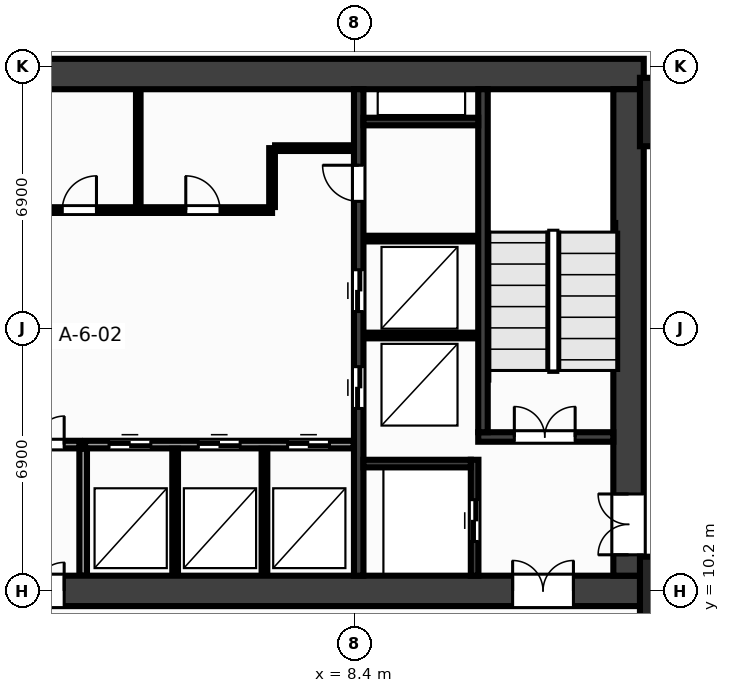
"""IFC4 building model, lengths in metres.
Left out: names, types, materials, properties, quantities, classifications, styles, units other than length and angle.
Written with IfcOpenShell. Run it as: python <this file> out.ifc"""

import sys

from ifc_helpers import new_model, si_unit, direction, frame, frame_2d, origin, origin_2d, place, context, subcontext, project, spatial, rectangle, extrude, source, transform, mapped, element, fill, save


model = new_model("IFC4")
c1 = context("Model", 3, precision=1e-05, world=origin(), true_north=direction((0.0, 1.0)))
c2 = subcontext(c1, "Body", "Model", "MODEL_VIEW")
j1 = project(units=[si_unit("LENGTHUNIT", "METRE"), si_unit("PLANEANGLEUNIT", "RADIAN")], contexts=[c1])
p1 = place(None, origin())
s1 = spatial("IfcSite", under=j1, at=p1, CompositionType="ELEMENT")
p2 = place(p1, origin())
s2 = spatial("IfcBuilding", under=s1, at=p2, CompositionType="ELEMENT")
p3 = place(p2, origin())
s3 = spatial("IfcBuildingStorey", under=s2, at=p3, CompositionType="ELEMENT", Elevation=0.0)
m1 = source(origin(), c2, "Body", "SweptSolid", [
    extrude(rectangle(XDim=32.0, YDim=0.8, at=frame_2d((16.0, 0.0))), origin(), (0.0, 0.0, 1.0), 5.0),
])
p4 = place(p3, frame((-16.0, 23.8, 0.0), z_axis=(0.0, 0.0, 1.0), x_axis=(1.0, 0.0, 0.0)))
e1 = element("IfcWall", 1, at=p4, inside=s3, PredefinedType="SHEAR", context=c2, shape_type="MappedRepresentation", body=[
    mapped(m1, transform((0.0, 0.0, 0.0), x_axis=(1.0, 0.0, 0.0), y_axis=(0.0, 1.0, 0.0), z_axis=(0.0, 0.0, 1.0), scale=1.0)),
])
p5 = place(p3, frame((-16.0, 10.2, 0.0), z_axis=(0.0, 0.0, 1.0), x_axis=(1.0, 0.0, 0.0)))
e2 = element("IfcWall", 2, at=p5, inside=s3, PredefinedType="SHEAR", context=c2, shape_type="MappedRepresentation", body=[
    mapped(m1, transform((0.0, 0.0, 0.0), x_axis=(1.0, 0.0, 0.0), y_axis=(0.0, 1.0, 0.0), z_axis=(0.0, 0.0, 1.0), scale=1.0)),
])
p6 = place(p5, frame((28.55, 0.0, 0.0)))
e3 = element("IfcOpeningElement", 3, at=p6, cuts=e2, PredefinedType="OPENING", context=c2, shape_type="SweptSolid", body=[
    extrude(rectangle(XDim=1.6, YDim=2.15, at=frame_2d((0.8, 1.075))), frame((0.0, 0.412, 0.0), z_axis=(0.0, -1.0, 0.0), x_axis=(1.0, 0.0, 0.0)), (0.0, 0.0, 1.0), 0.824),
])
p7 = place(p5, frame((15.25, 0.0, 0.0)))
e4 = element("IfcOpeningElement", 4, at=p7, cuts=e2, PredefinedType="OPENING", context=c2, shape_type="SweptSolid", body=[
    extrude(rectangle(XDim=1.5, YDim=2.2, at=frame_2d((0.75, 1.1))), frame((0.0, 0.412, 0.0), z_axis=(0.0, -1.0, 0.0), x_axis=(1.0, 0.0, 0.0)), (0.0, 0.0, 1.0), 0.824),
])
m2 = source(origin(), c2, "Body", "SweptSolid", [
    extrude(rectangle(XDim=12.8, YDim=0.8, at=frame_2d((6.4, 0.0))), origin(), (0.0, 0.0, 1.0), 5.0),
])
p8 = place(p3, frame((15.6, 10.6, 0.0), z_axis=(0.0, 0.0, 1.0), x_axis=(0.0, 1.0, 0.0)))
e5 = element("IfcWall", 5, at=p8, inside=s3, PredefinedType="SHEAR", context=c2, shape_type="MappedRepresentation", body=[
    mapped(m2, transform((0.0, 0.0, 0.0), x_axis=(1.0, 0.0, 0.0), y_axis=(0.0, 1.0, 0.0), z_axis=(0.0, 0.0, 1.0), scale=1.0)),
])
p9 = place(p8, frame((0.55, 0.0, 0.0)))
e6 = element("IfcOpeningElement", 6, at=p9, cuts=e5, PredefinedType="OPENING", context=c2, shape_type="SweptSolid", body=[
    extrude(rectangle(XDim=1.6, YDim=2.15, at=frame_2d((0.8, 1.075))), frame((0.0, 0.412, 0.0), z_axis=(0.0, -1.0, 0.0), x_axis=(1.0, 0.0, 0.0)), (0.0, 0.0, 1.0), 0.824),
])
m3 = source(origin(), c2, "Body", "SweptSolid", [
    extrude(rectangle(XDim=12.8, YDim=0.25, at=frame_2d((6.4, 0.0))), origin(), (0.0, 0.0, 1.0), 5.0),
])
p10 = place(p3, frame((8.5, 10.6, 0.0), z_axis=(0.0, 0.0, 1.0), x_axis=(0.0, 1.0, 0.0)))
e7 = element("IfcWall", 7, at=p10, inside=s3, PredefinedType="SHEAR", context=c2, shape_type="MappedRepresentation", body=[
    mapped(m3, transform((0.0, 0.0, 0.0), x_axis=(1.0, 0.0, 0.0), y_axis=(0.0, 1.0, 0.0), z_axis=(0.0, 0.0, 1.0), scale=1.0)),
])
p11 = place(p10, frame((4.4, 0.0, 0.0)))
e8 = element("IfcOpeningElement", 8, at=p11, cuts=e7, PredefinedType="OPENING", context=c2, shape_type="SweptSolid", body=[
    extrude(rectangle(XDim=1.1, YDim=2.15, at=frame_2d((0.55, 1.075))), frame((0.0, 0.137, 0.0), z_axis=(0.0, -1.0, 0.0), x_axis=(1.0, 0.0, 0.0)), (0.0, 0.0, 1.0), 0.274),
])
p12 = place(p10, frame((6.95, 0.0, 0.0)))
e9 = element("IfcOpeningElement", 9, at=p12, cuts=e7, PredefinedType="OPENING", context=c2, shape_type="SweptSolid", body=[
    extrude(rectangle(XDim=1.1, YDim=2.15, at=frame_2d((0.55, 1.075))), frame((0.0, 0.137, 0.0), z_axis=(0.0, -1.0, 0.0), x_axis=(1.0, 0.0, 0.0)), (0.0, 0.0, 1.0), 0.274),
])
p13 = place(p10, frame((9.85, 0.0, 0.0)))
e10 = element("IfcOpeningElement", 10, at=p13, cuts=e7, PredefinedType="OPENING", context=c2, shape_type="SweptSolid", body=[
    extrude(rectangle(XDim=0.95, YDim=2.15, at=frame_2d((0.475, 1.075))), frame((0.0, 0.137, 0.0), z_axis=(0.0, -1.0, 0.0), x_axis=(1.0, 0.0, 0.0)), (0.0, 0.0, 1.0), 0.274),
])
m4 = source(origin(), c2, "Body", "SweptSolid", [
    extrude(rectangle(XDim=3.555, YDim=0.25, at=frame_2d((1.777, 0.0))), origin(), (0.0, 0.0, 1.0), 5.0),
])
p14 = place(p3, frame((11.645, 14.25, 0.0), z_axis=(0.0, 0.0, 1.0), x_axis=(1.0, 0.0, 0.0)))
e11 = element("IfcWall", 11, at=p14, inside=s3, PredefinedType="SHEAR", context=c2, shape_type="MappedRepresentation", body=[
    mapped(m4, transform((0.0, 0.0, 0.0), x_axis=(1.0, 0.0, 0.0), y_axis=(0.0, 1.0, 0.0), z_axis=(0.0, 0.0, 1.0), scale=1.0)),
])
p15 = place(p14, frame((0.95, 0.0, 0.0)))
e12 = element("IfcOpeningElement", 12, at=p15, cuts=e11, PredefinedType="OPENING", context=c2, shape_type="SweptSolid", body=[
    extrude(rectangle(XDim=1.6, YDim=2.15, at=frame_2d((0.8, 1.075))), frame((0.0, 0.137, 0.0), z_axis=(0.0, -1.0, 0.0), x_axis=(1.0, 0.0, 0.0)), (0.0, 0.0, 1.0), 0.274),
])
m5 = source(origin(), c2, "Body", "SweptSolid", [
    extrude(rectangle(XDim=9.025, YDim=0.25, at=frame_2d((4.512, 0.0))), origin(), (0.0, 0.0, 1.0), 5.0),
])
p16 = place(p3, frame((11.77, 14.375, 0.0), z_axis=(0.0, 0.0, 1.0), x_axis=(0.0, 1.0, 0.0)))
e13 = element("IfcWall", 13, at=p16, inside=s3, PredefinedType="SHEAR", context=c2, shape_type="MappedRepresentation", body=[
    mapped(m5, transform((0.0, 0.0, 0.0), x_axis=(1.0, 0.0, 0.0), y_axis=(0.0, 1.0, 0.0), z_axis=(0.0, 0.0, 1.0), scale=1.0)),
])
m6 = source(origin(), c2, "Body", "SweptSolid", [
    extrude(rectangle(XDim=3.05, YDim=0.2, at=frame_2d((1.525, 0.0))), origin(), (0.0, 0.0, 1.0), 5.0),
])
p17 = place(p3, frame((11.55, 10.6, 0.0), z_axis=(0.0, 0.0, 1.0), x_axis=(0.0, 1.0, 0.0)))
e14 = element("IfcWall", 14, at=p17, inside=s3, PredefinedType="SHEAR", context=c2, shape_type="MappedRepresentation", body=[
    mapped(m6, transform((0.0, 0.0, 0.0), x_axis=(1.0, 0.0, 0.0), y_axis=(0.0, 1.0, 0.0), z_axis=(0.0, 0.0, 1.0), scale=1.0)),
])
p18 = place(p17, frame((0.9, 0.0, 0.0)))
e15 = element("IfcOpeningElement", 15, at=p18, cuts=e14, PredefinedType="OPENING", context=c2, shape_type="SweptSolid", body=[
    extrude(rectangle(XDim=1.1, YDim=2.15, at=frame_2d((0.55, 1.075))), frame((0.0, 0.112, 0.0), z_axis=(0.0, -1.0, 0.0), x_axis=(1.0, 0.0, 0.0)), (0.0, 0.0, 1.0), 0.224),
])
m7 = source(origin(), c2, "Body", "SweptSolid", [
    extrude(rectangle(XDim=2.825, YDim=0.2, at=frame_2d((1.413, 0.0))), origin(), (0.0, 0.0, 1.0), 5.0),
])
p19 = place(p3, frame((8.625, 13.55, 0.0), z_axis=(0.0, 0.0, 1.0), x_axis=(1.0, 0.0, 0.0)))
e16 = element("IfcWall", 16, at=p19, inside=s3, PredefinedType="SHEAR", context=c2, shape_type="MappedRepresentation", body=[
    mapped(m7, transform((0.0, 0.0, 0.0), x_axis=(1.0, 0.0, 0.0), y_axis=(0.0, 1.0, 0.0), z_axis=(0.0, 0.0, 1.0), scale=1.0)),
])
m8 = source(origin(), c2, "Body", "SweptSolid", [
    extrude(rectangle(XDim=3.02, YDim=0.2, at=frame_2d((1.51, 0.0))), origin(), (0.0, 0.0, 1.0), 5.0),
])
p20 = place(p3, frame((8.625, 22.55, 0.0), z_axis=(0.0, 0.0, 1.0), x_axis=(1.0, 0.0, 0.0)))
e17 = element("IfcWall", 17, at=p20, inside=s3, PredefinedType="SHEAR", context=c2, shape_type="MappedRepresentation", body=[
    mapped(m8, transform((0.0, 0.0, 0.0), x_axis=(1.0, 0.0, 0.0), y_axis=(0.0, 1.0, 0.0), z_axis=(0.0, 0.0, 1.0), scale=1.0)),
])
m9 = source(origin(), c2, "Body", "SweptSolid", [
    extrude(rectangle(XDim=1.8, YDim=1.8, at=origin_2d()), origin(), (0.0, 0.0, 1.0), 5.0),
])
for number, where, z_axis, x_axis in (
    (18, (16.8, 10.2, 0.0), (0.0, 0.0, 1.0), (1.0, 0.0, 0.0)),
    (19, (16.8, 22.8, 0.0), (0.0, 0.0, 1.0), (1.0, 0.0, 0.0)),
):
    element("IfcColumn", number, at=place(p3, frame(where, z_axis=z_axis, x_axis=x_axis)), inside=s3, PredefinedType="COLUMN", context=c2, shape_type="MappedRepresentation", body=[
        mapped(m9, transform((0.0, 0.0, 0.0), x_axis=(1.0, 0.0, 0.0), y_axis=(0.0, 1.0, 0.0), z_axis=(0.0, 0.0, 1.0), scale=1.0)),
    ])
m10 = source(origin(), c2, "Body", "SweptSolid", [
    extrude(rectangle(XDim=3.01, YDim=0.15, at=frame_2d((1.505, 0.0))), origin(), (0.0, 0.0, 1.0), 4.72),
])
for number, where, z_axis, x_axis in (
    (20, (8.63, 16.92, 0.0), (0.0, 0.0, 1.0), (1.0, 0.0, 0.0)),
    (21, (8.63, 19.47, 0.0), (0.0, 0.0, 1.0), (1.0, 0.0, 0.0)),
):
    element("IfcWall", number, at=place(p3, frame(where, z_axis=z_axis, x_axis=x_axis)), inside=s3, PredefinedType="PARTITIONING", context=c2, shape_type="MappedRepresentation", body=[
        mapped(m10, transform((0.0, 0.0, 0.0), x_axis=(1.0, 0.0, 0.0), y_axis=(0.0, 1.0, 0.0), z_axis=(0.0, 0.0, 1.0), scale=1.0)),
    ])
m11 = source(origin(), c2, "Body", "SweptSolid", [
    extrude(rectangle(XDim=7.07, YDim=0.2, at=frame_2d((3.535, 0.0))), origin(), (0.0, 0.0, 1.0), 4.72),
])
p21 = place(p3, frame((1.3, 14.05, 0.0), z_axis=(0.0, 0.0, 1.0), x_axis=(1.0, 0.0, 0.0)))
e22 = element("IfcWall", 22, at=p21, inside=s3, PredefinedType="PARTITIONING", context=c2, shape_type="MappedRepresentation", body=[
    mapped(m11, transform((0.0, 0.0, 0.0), x_axis=(1.0, 0.0, 0.0), y_axis=(0.0, 1.0, 0.0), z_axis=(0.0, 0.0, 1.0), scale=1.0)),
])
p22 = place(p21, frame((0.63, 0.0, 0.0)))
e23 = element("IfcOpeningElement", 23, at=p22, cuts=e22, PredefinedType="OPENING", context=c2, shape_type="SweptSolid", body=[
    extrude(rectangle(XDim=1.1, YDim=2.15, at=frame_2d((0.55, 1.075))), frame((0.0, 0.112, 0.0), z_axis=(0.0, -1.0, 0.0), x_axis=(1.0, 0.0, 0.0)), (0.0, 0.0, 1.0), 0.224),
])
p23 = place(p21, frame((2.98, 0.0, 0.0)))
e24 = element("IfcOpeningElement", 24, at=p23, cuts=e22, PredefinedType="OPENING", context=c2, shape_type="SweptSolid", body=[
    extrude(rectangle(XDim=1.1, YDim=2.15, at=frame_2d((0.55, 1.075))), frame((0.0, 0.112, 0.0), z_axis=(0.0, -1.0, 0.0), x_axis=(1.0, 0.0, 0.0)), (0.0, 0.0, 1.0), 0.224),
])
p24 = place(p21, frame((5.33, 0.0, 0.0)))
e25 = element("IfcOpeningElement", 25, at=p24, cuts=e22, PredefinedType="OPENING", context=c2, shape_type="SweptSolid", body=[
    extrude(rectangle(XDim=1.1, YDim=2.15, at=frame_2d((0.55, 1.075))), frame((0.0, 0.112, 0.0), z_axis=(0.0, -1.0, 0.0), x_axis=(1.0, 0.0, 0.0)), (0.0, 0.0, 1.0), 0.224),
])
m12 = source(origin(), c2, "Body", "SweptSolid", [
    extrude(rectangle(XDim=3.34, YDim=0.2, at=frame_2d((1.67, 0.0))), origin(), (0.0, 0.0, 1.0), 4.72),
])
p25 = place(p3, frame((1.25, 10.6, 0.0), z_axis=(0.0, 0.0, 1.0), x_axis=(0.0, 1.0, 0.0)))
e26 = element("IfcWall", 26, at=p25, inside=s3, PredefinedType="PARTITIONING", context=c2, shape_type="MappedRepresentation", body=[
    mapped(m12, transform((0.0, 0.0, 0.0), x_axis=(1.0, 0.0, 0.0), y_axis=(0.0, 1.0, 0.0), z_axis=(0.0, 0.0, 1.0), scale=1.0)),
])
m13 = source(origin(), c2, "Body", "SweptSolid", [
    extrude(rectangle(XDim=2.3, YDim=0.2, at=frame_2d((1.15, 0.0))), origin(), (0.0, 0.0, 1.0), 4.72),
])
p26 = place(p3, frame((-1.15, 14.05, 0.0), z_axis=(0.0, 0.0, 1.0), x_axis=(1.0, 0.0, 0.0)))
e27 = element("IfcWall", 27, at=p26, inside=s3, PredefinedType="PARTITIONING", context=c2, shape_type="MappedRepresentation", body=[
    mapped(m13, transform((0.0, 0.0, 0.0), x_axis=(1.0, 0.0, 0.0), y_axis=(0.0, 1.0, 0.0), z_axis=(0.0, 0.0, 1.0), scale=1.0)),
])
p27 = place(p26, frame((0.4, 0.0, 0.0)))
e28 = element("IfcOpeningElement", 28, at=p27, cuts=e27, PredefinedType="OPENING", context=c2, shape_type="SweptSolid", body=[
    extrude(rectangle(XDim=1.5, YDim=2.2, at=frame_2d((0.75, 1.1))), frame((0.0, 0.112, 0.0), z_axis=(0.0, -1.0, 0.0), x_axis=(1.0, 0.0, 0.0)), (0.0, 0.0, 1.0), 0.224),
])
m14 = source(origin(), c2, "Body", "SweptSolid", [
    extrude(rectangle(XDim=14.59, YDim=0.15, at=frame_2d((7.295, 0.0))), origin(), (0.0, 0.0, 1.0), 4.72),
])
p28 = place(p3, frame((-8.37, 20.22, 0.0), z_axis=(0.0, 0.0, 1.0), x_axis=(1.0, 0.0, 0.0)))
e29 = element("IfcWall", 29, at=p28, inside=s3, PredefinedType="PARTITIONING", context=c2, shape_type="MappedRepresentation", body=[
    mapped(m14, transform((0.0, 0.0, 0.0), x_axis=(1.0, 0.0, 0.0), y_axis=(0.0, 1.0, 0.0), z_axis=(0.0, 0.0, 1.0), scale=1.0)),
])
p29 = place(p28, frame((0.86, 0.0, 0.0)))
e30 = element("IfcOpeningElement", 30, at=p29, cuts=e29, PredefinedType="OPENING", context=c2, shape_type="SweptSolid", body=[
    extrude(rectangle(XDim=0.9, YDim=2.15, at=frame_2d((0.45, 1.075))), frame((0.0, 0.087, 0.0), z_axis=(0.0, -1.0, 0.0), x_axis=(1.0, 0.0, 0.0)), (0.0, 0.0, 1.0), 0.174),
])
p30 = place(p28, frame((3.47, 0.0, 0.0)))
e31 = element("IfcOpeningElement", 31, at=p30, cuts=e29, PredefinedType="OPENING", context=c2, shape_type="SweptSolid", body=[
    extrude(rectangle(XDim=0.9, YDim=2.15, at=frame_2d((0.45, 1.075))), frame((0.0, 0.087, 0.0), z_axis=(0.0, -1.0, 0.0), x_axis=(1.0, 0.0, 0.0)), (0.0, 0.0, 1.0), 0.174),
])
p31 = place(p28, frame((6.17, 0.0, 0.0)))
e32 = element("IfcOpeningElement", 32, at=p31, cuts=e29, PredefinedType="OPENING", context=c2, shape_type="SweptSolid", body=[
    extrude(rectangle(XDim=0.9, YDim=2.15, at=frame_2d((0.45, 1.075))), frame((0.0, 0.087, 0.0), z_axis=(0.0, -1.0, 0.0), x_axis=(1.0, 0.0, 0.0)), (0.0, 0.0, 1.0), 0.174),
])
p32 = place(p28, frame((9.07, 0.0, 0.0)))
e33 = element("IfcOpeningElement", 33, at=p32, cuts=e29, PredefinedType="OPENING", context=c2, shape_type="SweptSolid", body=[
    extrude(rectangle(XDim=0.9, YDim=2.15, at=frame_2d((0.45, 1.075))), frame((0.0, 0.087, 0.0), z_axis=(0.0, -1.0, 0.0), x_axis=(1.0, 0.0, 0.0)), (0.0, 0.0, 1.0), 0.174),
])
p33 = place(p28, frame((12.32, 0.0, 0.0)))
e34 = element("IfcOpeningElement", 34, at=p33, cuts=e29, PredefinedType="OPENING", context=c2, shape_type="SweptSolid", body=[
    extrude(rectangle(XDim=0.9, YDim=2.15, at=frame_2d((0.45, 1.075))), frame((0.0, 0.087, 0.0), z_axis=(0.0, -1.0, 0.0), x_axis=(1.0, 0.0, 0.0)), (0.0, 0.0, 1.0), 0.174),
])
m15 = source(origin(), c2, "Body", "SweptSolid", [
    extrude(rectangle(XDim=1.55, YDim=0.15, at=frame_2d((0.775, 0.0))), origin(), (0.0, 0.0, 1.0), 4.72),
])
p34 = place(p3, frame((6.22, 20.3, 0.0), z_axis=(0.0, 0.0, 1.0), x_axis=(0.0, 1.0, 0.0)))
e35 = element("IfcWall", 35, at=p34, inside=s3, PredefinedType="PARTITIONING", context=c2, shape_type="MappedRepresentation", body=[
    mapped(m15, transform((0.0, 0.0, 0.0), x_axis=(1.0, 0.0, 0.0), y_axis=(0.0, 1.0, 0.0), z_axis=(0.0, 0.0, 1.0), scale=1.0)),
])
m16 = source(origin(), c2, "Body", "SweptSolid", [
    extrude(rectangle(XDim=2.07, YDim=0.15, at=frame_2d((1.035, 0.0))), origin(), (0.0, 0.0, 1.0), 4.72),
])
p35 = place(p3, frame((6.3, 21.85, 0.0), z_axis=(0.0, 0.0, 1.0), x_axis=(1.0, 0.0, 0.0)))
e36 = element("IfcWall", 36, at=p35, inside=s3, PredefinedType="PARTITIONING", context=c2, shape_type="MappedRepresentation", body=[
    mapped(m16, transform((0.0, 0.0, 0.0), x_axis=(1.0, 0.0, 0.0), y_axis=(0.0, 1.0, 0.0), z_axis=(0.0, 0.0, 1.0), scale=1.0)),
])
m17 = source(origin(), c2, "Body", "SweptSolid", [
    extrude(rectangle(XDim=3.34, YDim=0.15, at=frame_2d((1.67, 0.0))), origin(), (0.0, 0.0, 1.0), 4.72),
])
for number, where, z_axis, x_axis in (
    (37, (3.67, 10.6, 0.0), (0.0, 0.0, 1.0), (0.0, 1.0, 0.0)),
    (38, (6.02, 10.6, 0.0), (0.0, 0.0, 1.0), (0.0, 1.0, 0.0)),
):
    element("IfcWall", number, at=place(p3, frame(where, z_axis=z_axis, x_axis=x_axis)), inside=s3, PredefinedType="PARTITIONING", context=c2, shape_type="MappedRepresentation", body=[
        mapped(m17, transform((0.0, 0.0, 0.0), x_axis=(1.0, 0.0, 0.0), y_axis=(0.0, 1.0, 0.0), z_axis=(0.0, 0.0, 1.0), scale=1.0)),
    ])
m18 = source(origin(), c2, "Body", "SweptSolid", [
    extrude(rectangle(XDim=3.04, YDim=0.12, at=frame_2d((1.52, 0.0))), origin(), (0.0, 0.0, 1.0), 4.72),
])
p36 = place(p3, frame((2.7, 20.32, 0.0), z_axis=(0.0, 0.0, 1.0), x_axis=(0.0, 1.0, 0.0)))
e39 = element("IfcWall", 39, at=p36, inside=s3, PredefinedType="PARTITIONING", context=c2, shape_type="MappedRepresentation", body=[
    mapped(m18, transform((0.0, 0.0, 0.0), x_axis=(1.0, 0.0, 0.0), y_axis=(0.0, 1.0, 0.0), z_axis=(0.0, 0.0, 1.0), scale=1.0)),
])
m19 = source(origin(), c2, "Body", "SweptSolid", [
    extrude(rectangle(XDim=1.6, YDim=2.15, at=frame_2d((0.8, 1.075))), frame((0.0, 0.025, 0.0), z_axis=(0.0, -1.0, 0.0), x_axis=(1.0, 0.0, 0.0)), (0.0, 0.0, 1.0), 0.05),
])
p37 = place(p15, origin())
e40 = element("IfcDoor", 40, at=p37, inside=s3, OperationType="DOUBLE_DOOR_SINGLE_SWING", PredefinedType="DOOR", context=c2, shape_type="MappedRepresentation", body=[
    mapped(m19, transform((0.0, 0.0, 0.0), x_axis=(1.0, 0.0, 0.0), y_axis=(0.0, 1.0, 0.0), z_axis=(0.0, 0.0, 1.0), scale=1.0)),
])
fill(e12, e40)
p38 = place(p6, origin())
e41 = element("IfcDoor", 41, at=p38, inside=s3, OperationType="DOUBLE_DOOR_SINGLE_SWING", PredefinedType="DOOR", context=c2, shape_type="MappedRepresentation", body=[
    mapped(m19, transform((0.0, 0.0, 0.0), x_axis=(1.0, 0.0, 0.0), y_axis=(0.0, 1.0, 0.0), z_axis=(0.0, 0.0, 1.0), scale=1.0)),
])
fill(e3, e41)
p39 = place(p9, origin())
e42 = element("IfcDoor", 42, at=p39, inside=s3, OperationType="DOUBLE_DOOR_SINGLE_SWING", PredefinedType="DOOR", context=c2, shape_type="MappedRepresentation", body=[
    mapped(m19, transform((0.0, 0.0, 0.0), x_axis=(1.0, 0.0, 0.0), y_axis=(0.0, 1.0, 0.0), z_axis=(0.0, 0.0, 1.0), scale=1.0)),
])
fill(e6, e42)
m20 = source(origin(), c2, "Body", "SweptSolid", [
    extrude(rectangle(XDim=1.1, YDim=2.15, at=frame_2d((0.55, 1.075))), frame((0.0, 0.025, 0.0), z_axis=(0.0, -1.0, 0.0), x_axis=(1.0, 0.0, 0.0)), (0.0, 0.0, 1.0), 0.05),
])
p40 = place(p18, origin())
e43 = element("IfcDoor", 43, at=p40, inside=s3, OperationType="DOUBLE_DOOR_SLIDING", PredefinedType="DOOR", context=c2, shape_type="MappedRepresentation", body=[
    mapped(m20, transform((0.0, 0.0, 0.0), x_axis=(1.0, 0.0, 0.0), y_axis=(0.0, 1.0, 0.0), z_axis=(0.0, 0.0, 1.0), scale=1.0)),
])
fill(e15, e43)
p41 = place(p11, origin())
e44 = element("IfcDoor", 44, at=p41, inside=s3, OperationType="DOUBLE_DOOR_SLIDING", PredefinedType="DOOR", context=c2, shape_type="MappedRepresentation", body=[
    mapped(m20, transform((0.0, 0.0, 0.0), x_axis=(1.0, 0.0, 0.0), y_axis=(0.0, 1.0, 0.0), z_axis=(0.0, 0.0, 1.0), scale=1.0)),
])
fill(e8, e44)
p42 = place(p12, origin())
e45 = element("IfcDoor", 45, at=p42, inside=s3, OperationType="DOUBLE_DOOR_SLIDING", PredefinedType="DOOR", context=c2, shape_type="MappedRepresentation", body=[
    mapped(m20, transform((0.0, 0.0, 0.0), x_axis=(1.0, 0.0, 0.0), y_axis=(0.0, 1.0, 0.0), z_axis=(0.0, 0.0, 1.0), scale=1.0)),
])
fill(e9, e45)
m21 = source(origin(), c2, "Body", "SweptSolid", [
    extrude(rectangle(XDim=0.95, YDim=2.15, at=frame_2d((0.475, 1.075))), frame((0.0, 0.025, 0.0), z_axis=(0.0, -1.0, 0.0), x_axis=(1.0, 0.0, 0.0)), (0.0, 0.0, 1.0), 0.05),
])
p43 = place(p13, origin())
e46 = element("IfcDoor", 46, at=p43, inside=s3, OperationType="SINGLE_SWING_RIGHT", PredefinedType="DOOR", context=c2, shape_type="MappedRepresentation", body=[
    mapped(m21, transform((0.0, 0.0, 0.0), x_axis=(1.0, 0.0, 0.0), y_axis=(0.0, 1.0, 0.0), z_axis=(0.0, 0.0, 1.0), scale=1.0)),
])
fill(e10, e46)
p44 = place(p22, origin())
e47 = element("IfcDoor", 47, at=p44, inside=s3, OperationType="DOUBLE_DOOR_SLIDING", PredefinedType="DOOR", context=c2, shape_type="MappedRepresentation", body=[
    mapped(m20, transform((0.0, 0.0, 0.0), x_axis=(1.0, 0.0, 0.0), y_axis=(0.0, 1.0, 0.0), z_axis=(0.0, 0.0, 1.0), scale=1.0)),
])
fill(e23, e47)
p45 = place(p23, origin())
e48 = element("IfcDoor", 48, at=p45, inside=s3, OperationType="DOUBLE_DOOR_SLIDING", PredefinedType="DOOR", context=c2, shape_type="MappedRepresentation", body=[
    mapped(m20, transform((0.0, 0.0, 0.0), x_axis=(1.0, 0.0, 0.0), y_axis=(0.0, 1.0, 0.0), z_axis=(0.0, 0.0, 1.0), scale=1.0)),
])
fill(e24, e48)
p46 = place(p24, origin())
e49 = element("IfcDoor", 49, at=p46, inside=s3, OperationType="DOUBLE_DOOR_SLIDING", PredefinedType="DOOR", context=c2, shape_type="MappedRepresentation", body=[
    mapped(m20, transform((0.0, 0.0, 0.0), x_axis=(1.0, 0.0, 0.0), y_axis=(0.0, 1.0, 0.0), z_axis=(0.0, 0.0, 1.0), scale=1.0)),
])
fill(e25, e49)
m22 = source(origin(), c2, "Body", "SweptSolid", [
    extrude(rectangle(XDim=1.5, YDim=2.2, at=frame_2d((0.75, 1.1))), frame((0.0, 0.025, 0.0), z_axis=(0.0, -1.0, 0.0), x_axis=(1.0, 0.0, 0.0)), (0.0, 0.0, 1.0), 0.05),
])
p47 = place(p27, origin())
e50 = element("IfcDoor", 50, at=p47, inside=s3, OperationType="DOUBLE_DOOR_SINGLE_SWING", PredefinedType="DOOR", context=c2, shape_type="MappedRepresentation", body=[
    mapped(m22, transform((0.0, 0.0, 0.0), x_axis=(1.0, 0.0, 0.0), y_axis=(0.0, 1.0, 0.0), z_axis=(0.0, 0.0, 1.0), scale=1.0)),
])
fill(e28, e50)
p48 = place(p7, origin())
e51 = element("IfcDoor", 51, at=p48, inside=s3, OperationType="DOUBLE_DOOR_SINGLE_SWING", PredefinedType="DOOR", context=c2, shape_type="MappedRepresentation", body=[
    mapped(m22, transform((0.0, 0.0, 0.0), x_axis=(1.0, 0.0, 0.0), y_axis=(0.0, 1.0, 0.0), z_axis=(0.0, 0.0, 1.0), scale=1.0)),
])
fill(e4, e51)
m23 = source(origin(), c2, "Body", "SweptSolid", [
    extrude(rectangle(XDim=0.9, YDim=2.15, at=frame_2d((0.45, 1.075))), frame((0.0, 0.025, 0.0), z_axis=(0.0, -1.0, 0.0), x_axis=(1.0, 0.0, 0.0)), (0.0, 0.0, 1.0), 0.05),
])
p49 = place(p32, origin())
e52 = element("IfcDoor", 52, at=p49, inside=s3, OperationType="SINGLE_SWING_RIGHT", PredefinedType="DOOR", context=c2, shape_type="MappedRepresentation", body=[
    mapped(m23, transform((0.0, 0.0, 0.0), x_axis=(1.0, 0.0, 0.0), y_axis=(0.0, 1.0, 0.0), z_axis=(0.0, 0.0, 1.0), scale=1.0)),
])
fill(e33, e52)
p50 = place(p33, origin())
e53 = element("IfcDoor", 53, at=p50, inside=s3, OperationType="SINGLE_SWING_LEFT", PredefinedType="DOOR", context=c2, shape_type="MappedRepresentation", body=[
    mapped(m23, transform((0.0, 0.0, 0.0), x_axis=(1.0, 0.0, 0.0), y_axis=(0.0, 1.0, 0.0), z_axis=(0.0, 0.0, 1.0), scale=1.0)),
])
fill(e34, e53)
save(model, sys.argv[1])
